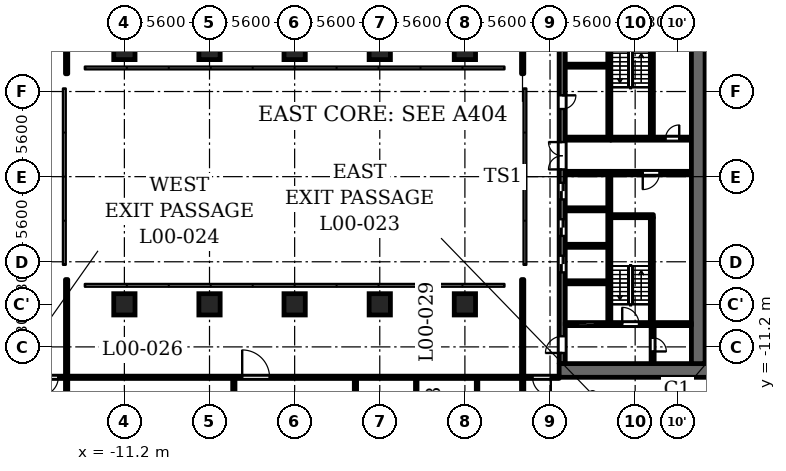
"""IFC4 building model, lengths in metres.
Left out: names, types, materials, properties, quantities, classifications, styles, units other than length and angle.
Written with IfcOpenShell. Run it as: python <this file> out.ifc"""

import sys

from ifc_helpers import new_model, si_unit, direction, frame, frame_2d, origin, origin_2d, place, context, subcontext, project, spatial, polyline, rectangle, outline, extrude, element, fill, save


model = new_model("IFC4")
c1 = context("Model", 3, precision=1e-05, world=origin(), true_north=direction((0.0, 1.0)))
c2 = subcontext(c1, "Body", "Model", "MODEL_VIEW")
j1 = project(units=[si_unit("LENGTHUNIT", "METRE"), si_unit("PLANEANGLEUNIT", "RADIAN")], contexts=[c1])
p1 = place(None, origin())
s1 = spatial("IfcSite", under=j1, at=p1, CompositionType="ELEMENT")
p2 = place(p1, origin())
s2 = spatial("IfcBuilding", under=s1, at=p2, CompositionType="ELEMENT")
p3 = place(p2, origin())
s3 = spatial("IfcBuildingStorey", under=s2, at=p3, CompositionType="ELEMENT", Elevation=0.0)
for number, where, z_axis, x_axis in (
    (1, (28.0, -11.2, 0.0), (0.0, 0.0, 1.0), (1.0, 0.0, 0.0)),
    (2, (28.0, -5.6, 0.0), (0.0, 0.0, 1.0), (1.0, 0.0, 0.0)),
    (3, (28.0, 0.0, 0.0), (0.0, 0.0, 1.0), (1.0, 0.0, 0.0)),
    (4, (28.0, 5.6, 0.0), (0.0, 0.0, 1.0), (1.0, 0.0, 0.0)),
):
    element("IfcColumn", number, at=place(p3, frame(where, z_axis=z_axis, x_axis=x_axis)), inside=s3, PredefinedType="COLUMN", context=c2, shape_type="SweptSolid", body=[
        extrude(rectangle(XDim=1.8, YDim=1.8, at=origin_2d()), origin(), (0.0, 0.0, 1.0), 6.5),
    ])
for number, where, z_axis, x_axis in (
    (5, (-11.2, -8.4, 0.0), (0.0, 0.0, 1.0), (1.0, 0.0, 0.0)),
    (6, (-11.2, 8.4, 0.0), (0.0, 0.0, 1.0), (1.0, 0.0, 0.0)),
    (7, (-5.6, -8.4, 0.0), (0.0, 0.0, 1.0), (1.0, 0.0, 0.0)),
    (8, (-5.6, 8.4, 0.0), (0.0, 0.0, 1.0), (1.0, 0.0, 0.0)),
    (9, (0.0, -8.4, 0.0), (0.0, 0.0, 1.0), (1.0, 0.0, 0.0)),
    (10, (0.0, 8.4, 0.0), (0.0, 0.0, 1.0), (1.0, 0.0, 0.0)),
    (11, (5.6, -8.4, 0.0), (0.0, 0.0, 1.0), (1.0, 0.0, 0.0)),
    (12, (5.6, 8.4, 0.0), (0.0, 0.0, 1.0), (1.0, 0.0, 0.0)),
    (13, (11.2, -8.4, 0.0), (0.0, 0.0, 1.0), (1.0, 0.0, 0.0)),
    (14, (11.2, 8.4, 0.0), (0.0, 0.0, 1.0), (1.0, 0.0, 0.0)),
):
    element("IfcColumn", number, at=place(p3, frame(where, z_axis=z_axis, x_axis=x_axis)), inside=s3, PredefinedType="COLUMN", context=c2, shape_type="SweptSolid", body=[
        extrude(rectangle(XDim=1.4, YDim=1.4, at=origin_2d()), origin(), (0.0, 0.0, 1.0), 6.5),
    ])
p4 = place(p3, frame((20.7, 2.6, 0.0), z_axis=(0.0, 0.0, 1.0), x_axis=(0.0, 1.0, 0.0)))
e15 = element("IfcWall", 15, at=p4, inside=s3, PredefinedType="SHEAR", context=c2, shape_type="SweptSolid", body=[
    extrude(rectangle(XDim=7.0, YDim=0.2, at=frame_2d((3.5, 0.0))), origin(), (0.0, 0.0, 1.0), 6.15),
])
p5 = place(p3, frame((20.7, -9.6, 0.0), z_axis=(0.0, 0.0, 1.0), x_axis=(0.0, 1.0, 0.0)))
e16 = element("IfcWall", 16, at=p5, inside=s3, PredefinedType="SHEAR", context=c2, shape_type="SweptSolid", body=[
    extrude(rectangle(XDim=9.75, YDim=0.2, at=frame_2d((4.875, 0.0))), origin(), (0.0, 0.0, 1.0), 6.15),
])
p6 = place(p3, frame((20.8, 2.5, 0.0), z_axis=(0.0, 0.0, 1.0), x_axis=(1.0, 0.0, 0.0)))
e17 = element("IfcWall", 17, at=p6, inside=s3, PredefinedType="SHEAR", context=c2, shape_type="SweptSolid", body=[
    extrude(rectangle(XDim=5.3, YDim=0.2, at=frame_2d((2.65, 0.0))), origin(), (0.0, 0.0, 1.0), 6.15),
])
p7 = place(p6, frame((3.6, 0.0, 0.0)))
e18 = element("IfcOpeningElement", 18, at=p7, cuts=e17, PredefinedType="OPENING", context=c2, shape_type="SweptSolid", body=[
    extrude(rectangle(XDim=0.9, YDim=2.1, at=frame_2d((0.45, 1.05))), frame((0.0, 0.11, 0.0), z_axis=(0.0, -1.0, 0.0), x_axis=(1.0, 0.0, 0.0)), (0.0, 0.0, 1.0), 0.22),
])
p8 = place(p3, frame((20.8, 0.25, 0.0), z_axis=(0.0, 0.0, 1.0), x_axis=(1.0, 0.0, 0.0)))
e19 = element("IfcWall", 19, at=p8, inside=s3, PredefinedType="PARTITIONING", context=c2, shape_type="SweptSolid", body=[
    extrude(rectangle(XDim=5.3, YDim=0.2, at=frame_2d((2.65, 0.0))), origin(), (0.0, 0.0, 1.0), 6.15),
])
p9 = place(p8, frame((2.1, 0.0, 0.0)))
e20 = element("IfcOpeningElement", 20, at=p9, cuts=e19, PredefinedType="OPENING", context=c2, shape_type="SweptSolid", body=[
    extrude(rectangle(XDim=1.1, YDim=2.1, at=frame_2d((0.55, 1.05))), frame((0.0, 0.11, 0.0), z_axis=(0.0, -1.0, 0.0), x_axis=(1.0, 0.0, 0.0)), (0.0, 0.0, 1.0), 0.22),
])
p10 = place(p3, frame((17.4, -12.75, 0.0), z_axis=(0.0, 0.0, 1.0), x_axis=(1.0, 0.0, 0.0)))
e21 = element("IfcWall", 21, at=p10, inside=s3, PredefinedType="SHEAR", context=c2, shape_type="SweptSolid", body=[
    extrude(rectangle(XDim=10.4, YDim=0.9, at=frame_2d((5.2, 0.0))), origin(), (0.0, 0.0, 1.0), 6.15),
])
p11 = place(p3, frame((17.6, -12.3, 0.0), z_axis=(0.0, 0.0, 1.0), x_axis=(0.0, 1.0, 0.0)))
e22 = element("IfcWall", 22, at=p11, inside=s3, PredefinedType="SHEAR", context=c2, shape_type="SweptSolid", body=[
    extrude(rectangle(XDim=24.6, YDim=0.4, at=frame_2d((12.3, 0.0))), origin(), (0.0, 0.0, 1.0), 6.15),
])
p12 = place(p11, frame((6.0, 0.0, 0.0)))
e23 = element("IfcOpeningElement", 23, at=p12, cuts=e22, PredefinedType="OPENING", context=c2, shape_type="SweptSolid", body=[
    extrude(rectangle(XDim=1.1, YDim=2.1, at=frame_2d((0.55, 1.05))), frame((0.0, 0.21, 0.0), z_axis=(0.0, -1.0, 0.0), x_axis=(1.0, 0.0, 0.0)), (0.0, 0.0, 1.0), 0.42),
])
p13 = place(p11, frame((8.4, 0.0, 0.0)))
e24 = element("IfcOpeningElement", 24, at=p13, cuts=e22, PredefinedType="OPENING", context=c2, shape_type="SweptSolid", body=[
    extrude(rectangle(XDim=1.1, YDim=2.1, at=frame_2d((0.55, 1.05))), frame((0.0, 0.21, 0.0), z_axis=(0.0, -1.0, 0.0), x_axis=(1.0, 0.0, 0.0)), (0.0, 0.0, 1.0), 0.42),
])
p14 = place(p11, frame((10.8, 0.0, 0.0)))
e25 = element("IfcOpeningElement", 25, at=p14, cuts=e22, PredefinedType="OPENING", context=c2, shape_type="SweptSolid", body=[
    extrude(rectangle(XDim=1.1, YDim=2.1, at=frame_2d((0.55, 1.05))), frame((0.0, 0.21, 0.0), z_axis=(0.0, -1.0, 0.0), x_axis=(1.0, 0.0, 0.0)), (0.0, 0.0, 1.0), 0.42),
])
p15 = place(p11, frame((16.75, 0.0, 0.0)))
e26 = element("IfcOpeningElement", 26, at=p15, cuts=e22, PredefinedType="OPENING", context=c2, shape_type="SweptSolid", body=[
    extrude(rectangle(XDim=0.9, YDim=2.1, at=frame_2d((0.45, 1.05))), frame((0.0, 0.21, 0.0), z_axis=(0.0, -1.0, 0.0), x_axis=(1.0, 0.0, 0.0)), (0.0, 0.0, 1.0), 0.42),
])
p16 = place(p11, frame((22.8, 0.0, 0.0)))
e27 = element("IfcOpeningElement", 27, at=p16, cuts=e22, PredefinedType="OPENING", context=c2, shape_type="SweptSolid", body=[
    extrude(rectangle(XDim=1.1, YDim=2.1, at=frame_2d((0.55, 1.05))), frame((0.0, 0.21, 0.0), z_axis=(0.0, -1.0, 0.0), x_axis=(1.0, 0.0, 0.0)), (0.0, 0.0, 1.0), 0.42),
])
p17 = place(p11, frame((0.7, 0.0, 0.0)))
e28 = element("IfcOpeningElement", 28, at=p17, cuts=e22, PredefinedType="OPENING", context=c2, shape_type="SweptSolid", body=[
    extrude(rectangle(XDim=1.1, YDim=2.1, at=frame_2d((0.55, 1.05))), frame((0.0, 0.21, 0.0), z_axis=(0.0, -1.0, 0.0), x_axis=(1.0, 0.0, 0.0)), (0.0, 0.0, 1.0), 0.42),
])
p18 = place(p11, frame((12.775, 0.0, 0.0)))
e29 = element("IfcOpeningElement", 29, at=p18, cuts=e22, PredefinedType="OPENING", context=c2, shape_type="SweptSolid", body=[
    extrude(rectangle(XDim=1.8, YDim=2.1, at=frame_2d((0.9, 1.05))), frame((0.0, 0.21, 0.0), z_axis=(0.0, -1.0, 0.0), x_axis=(1.0, 0.0, 0.0)), (0.0, 0.0, 1.0), 0.42),
])
p19 = place(p3, frame((26.55, -12.3, 0.0), z_axis=(0.0, 0.0, 1.0), x_axis=(0.0, 1.0, 0.0)))
e30 = element("IfcWall", 30, at=p19, inside=s3, PredefinedType="SHEAR", context=c2, shape_type="SweptSolid", body=[
    extrude(rectangle(XDim=24.6, YDim=0.9, at=frame_2d((12.3, 0.0))), origin(), (0.0, 0.0, 1.0), 6.15),
])
p20 = place(p3, frame((23.55, -12.3, 0.0), z_axis=(0.0, 0.0, 1.0), x_axis=(0.0, 1.0, 0.0)))
e31 = element("IfcWall", 31, at=p20, inside=s3, PredefinedType="PARTITIONING", context=c2, shape_type="SweptSolid", body=[
    extrude(rectangle(XDim=2.5, YDim=0.2, at=frame_2d((1.25, 0.0))), origin(), (0.0, 0.0, 1.0), 6.15),
])
p21 = place(p20, frame((0.8, 0.0, 0.0)))
e32 = element("IfcOpeningElement", 32, at=p21, cuts=e31, PredefinedType="OPENING", context=c2, shape_type="SweptSolid", body=[
    extrude(rectangle(XDim=0.9, YDim=2.1, at=frame_2d((0.45, 1.05))), frame((0.0, 0.11, 0.0), z_axis=(0.0, -1.0, 0.0), x_axis=(1.0, 0.0, 0.0)), (0.0, 0.0, 1.0), 0.22),
])
p22 = place(p3, frame((17.8, -9.7, 0.0), z_axis=(0.0, 0.0, 1.0), x_axis=(1.0, 0.0, 0.0)))
e33 = element("IfcWall", 33, at=p22, inside=s3, PredefinedType="SHEAR", context=c2, shape_type="SweptSolid", body=[
    extrude(rectangle(XDim=8.3, YDim=0.2, at=frame_2d((4.15, 0.0))), origin(), (0.0, 0.0, 1.0), 6.15),
])
p23 = place(p22, frame((0.85, 0.0, 0.0)))
e34 = element("IfcOpeningElement", 34, at=p23, cuts=e33, PredefinedType="OPENING", context=c2, shape_type="SweptSolid", body=[
    extrude(rectangle(XDim=1.1, YDim=2.1, at=frame_2d((0.55, 1.05))), frame((0.0, 0.11, 0.0), z_axis=(0.0, -1.0, 0.0), x_axis=(1.0, 0.0, 0.0)), (0.0, 0.0, 1.0), 0.22),
])
p24 = place(p22, frame((3.75, 0.0, 0.0)))
e35 = element("IfcOpeningElement", 35, at=p24, cuts=e33, PredefinedType="OPENING", context=c2, shape_type="SweptSolid", body=[
    extrude(rectangle(XDim=1.1, YDim=2.1, at=frame_2d((0.55, 1.05))), frame((0.0, 0.11, 0.0), z_axis=(0.0, -1.0, 0.0), x_axis=(1.0, 0.0, 0.0)), (0.0, 0.0, 1.0), 0.22),
])
for number, where, z_axis, x_axis in (
    (36, (17.8, -6.95, 0.0), (0.0, 0.0, 1.0), (1.0, 0.0, 0.0)),
    (37, (17.8, -4.55, 0.0), (0.0, 0.0, 1.0), (1.0, 0.0, 0.0)),
    (38, (17.8, -2.15, 0.0), (0.0, 0.0, 1.0), (1.0, 0.0, 0.0)),
):
    element("IfcWall", number, at=place(p3, frame(where, z_axis=z_axis, x_axis=x_axis)), inside=s3, PredefinedType="PARTITIONING", context=c2, shape_type="SweptSolid", body=[
        extrude(rectangle(XDim=2.8, YDim=0.2, at=frame_2d((1.4, 0.0))), origin(), (0.0, 0.0, 1.0), 6.15),
    ])
for number, where, z_axis, x_axis in (
    (39, (17.8, 0.25, 0.0), (0.0, 0.0, 1.0), (1.0, 0.0, 0.0)),
    (40, (17.8, 2.5, 0.0), (0.0, 0.0, 1.0), (1.0, 0.0, 0.0)),
):
    element("IfcWall", number, at=place(p3, frame(where, z_axis=z_axis, x_axis=x_axis)), inside=s3, PredefinedType="PARTITIONING", context=c2, shape_type="SweptSolid", body=[
        extrude(rectangle(XDim=3.0, YDim=0.2, at=frame_2d((1.5, 0.0))), origin(), (0.0, 0.0, 1.0), 6.15),
    ])
p25 = place(p3, frame((17.8, 7.3, 0.0), z_axis=(0.0, 0.0, 1.0), x_axis=(1.0, 0.0, 0.0)))
e41 = element("IfcWall", 41, at=p25, inside=s3, PredefinedType="PARTITIONING", context=c2, shape_type="SweptSolid", body=[
    extrude(rectangle(XDim=2.8, YDim=0.2, at=frame_2d((1.4, 0.0))), origin(), (0.0, 0.0, 1.0), 6.15),
])
p26 = place(p3, frame((23.5, 2.6, 0.0), z_axis=(0.0, 0.0, 1.0), x_axis=(0.0, 1.0, 0.0)))
e42 = element("IfcWall", 42, at=p26, inside=s3, PredefinedType="SHEAR", context=c2, shape_type="SweptSolid", body=[
    extrude(rectangle(XDim=7.0, YDim=0.2, at=frame_2d((3.5, 0.0))), origin(), (0.0, 0.0, 1.0), 6.15),
])
p27 = place(p3, frame((23.5, -9.6, 0.0), z_axis=(0.0, 0.0, 1.0), x_axis=(0.0, 1.0, 0.0)))
e43 = element("IfcWall", 43, at=p27, inside=s3, PredefinedType="SHEAR", context=c2, shape_type="SweptSolid", body=[
    extrude(rectangle(XDim=6.9, YDim=0.2, at=frame_2d((3.45, 0.0))), origin(), (0.0, 0.0, 1.0), 6.15),
])
p28 = place(p3, frame((20.8, -2.6, 0.0), z_axis=(0.0, 0.0, 1.0), x_axis=(1.0, 0.0, 0.0)))
e44 = element("IfcWall", 44, at=p28, inside=s3, PredefinedType="SHEAR", context=c2, shape_type="SweptSolid", body=[
    extrude(rectangle(XDim=2.8, YDim=0.2, at=frame_2d((1.4, 0.0))), origin(), (0.0, 0.0, 1.0), 6.15),
])
p29 = place(p3, frame((-17.4, -13.2, 0.0), z_axis=(0.0, 0.0, 1.0), x_axis=(1.0, 0.0, 0.0)))
e45 = element("IfcWall", 45, at=p29, inside=s3, PredefinedType="PARTITIONING", context=c2, shape_type="SweptSolid", body=[
    extrude(rectangle(XDim=34.8, YDim=0.15, at=frame_2d((17.4, 0.0))), origin(), (0.0, 0.0, 1.0), 6.15),
])
p30 = place(p29, frame((13.95, 0.0, 0.0)))
e46 = element("IfcOpeningElement", 46, at=p30, cuts=e45, PredefinedType="OPENING", context=c2, shape_type="SweptSolid", body=[
    extrude(rectangle(XDim=1.8, YDim=2.1, at=frame_2d((0.9, 1.05))), frame((0.0, 0.085, 0.0), z_axis=(0.0, -1.0, 0.0), x_axis=(1.0, 0.0, 0.0)), (0.0, 0.0, 1.0), 0.17),
])
p31 = place(p29, frame((33.05, 0.0, 0.0)))
e47 = element("IfcOpeningElement", 47, at=p31, cuts=e45, PredefinedType="OPENING", context=c2, shape_type="SweptSolid", body=[
    extrude(rectangle(XDim=1.2, YDim=2.1, at=frame_2d((0.6, 1.05))), frame((0.0, 0.085, 0.0), z_axis=(0.0, -1.0, 0.0), x_axis=(1.0, 0.0, 0.0)), (0.0, 0.0, 1.0), 0.17),
])
p32 = place(p29, frame((0.65, 0.0, 0.0)))
e48 = element("IfcOpeningElement", 48, at=p32, cuts=e45, PredefinedType="OPENING", context=c2, shape_type="SweptSolid", body=[
    extrude(rectangle(XDim=1.2, YDim=2.1, at=frame_2d((0.6, 1.05))), frame((0.0, 0.085, 0.0), z_axis=(0.0, -1.0, 0.0), x_axis=(1.0, 0.0, 0.0)), (0.0, 0.0, 1.0), 0.17),
])
p33 = place(p3, frame((-15.0, -15.525, 0.0), z_axis=(0.0, 0.0, 1.0), x_axis=(0.0, 1.0, 0.0)))
e49 = element("IfcWall", 49, at=p33, inside=s3, PredefinedType="PARTITIONING", context=c2, shape_type="SweptSolid", body=[
    extrude(rectangle(XDim=2.25, YDim=0.15, at=frame_2d((1.125, 0.0))), origin(), (0.0, 0.0, 1.0), 6.15),
])
for number, where, z_axis, x_axis in (
    (50, (-15.0, -13.125, 0.0), (0.0, 0.0, 1.0), (0.0, 1.0, 0.0)),
    (51, (-15.0, 6.769, 0.0), (0.0, 0.0, 1.0), (0.0, 1.0, 0.0)),
):
    element("IfcWall", number, at=place(p3, frame(where, z_axis=z_axis, x_axis=x_axis)), inside=s3, PredefinedType="PARTITIONING", context=c2, shape_type="SweptSolid", body=[
        extrude(rectangle(XDim=6.356, YDim=0.15, at=frame_2d((3.178, 0.0))), origin(), (0.0, 0.0, 1.0), 6.15),
    ])
for number, where, z_axis, x_axis in (
    (52, (-4.0, -22.325, 0.0), (0.0, 0.0, 1.0), (0.0, 1.0, 0.0)),
    (53, (4.0, -22.325, 0.0), (0.0, 0.0, 1.0), (0.0, 1.0, 0.0)),
):
    element("IfcWall", number, at=place(p3, frame(where, z_axis=z_axis, x_axis=x_axis)), inside=s3, PredefinedType="PARTITIONING", context=c2, shape_type="SweptSolid", body=[
        extrude(rectangle(XDim=9.05, YDim=0.15, at=frame_2d((4.525, 0.0))), origin(), (0.0, 0.0, 1.0), 6.15),
    ])
for number, where, z_axis, x_axis in (
    (54, (8.0, -22.325, 0.0), (0.0, 0.0, 1.0), (0.0, 1.0, 0.0)),
    (55, (12.0, -22.325, 0.0), (0.0, 0.0, 1.0), (0.0, 1.0, 0.0)),
):
    element("IfcWall", number, at=place(p3, frame(where, z_axis=z_axis, x_axis=x_axis)), inside=s3, PredefinedType="PARTITIONING", context=c2, shape_type="SweptSolid", body=[
        extrude(rectangle(XDim=9.05, YDim=0.1, at=frame_2d((4.525, 0.0))), origin(), (0.0, 0.0, 1.0), 6.15),
    ])
p34 = place(p3, frame((15.0, -15.6, 0.0), z_axis=(0.0, 0.0, 1.0), x_axis=(0.0, 1.0, 0.0)))
e56 = element("IfcWall", 56, at=p34, inside=s3, PredefinedType="PARTITIONING", context=c2, shape_type="SweptSolid", body=[
    extrude(rectangle(XDim=2.325, YDim=0.15, at=frame_2d((1.163, 0.0))), origin(), (0.0, 0.0, 1.0), 6.15),
])
for number, where, z_axis, x_axis in (
    (57, (15.0, -13.125, 0.0), (0.0, 0.0, 1.0), (0.0, 1.0, 0.0)),
    (58, (15.0, 6.769, 0.0), (0.0, 0.0, 1.0), (0.0, 1.0, 0.0)),
):
    element("IfcWall", number, at=place(p3, frame(where, z_axis=z_axis, x_axis=x_axis)), inside=s3, PredefinedType="PARTITIONING", context=c2, shape_type="SweptSolid", body=[
        extrude(rectangle(XDim=6.356, YDim=0.15, at=frame_2d((3.178, 0.0))), origin(), (0.0, 0.0, 1.0), 6.15),
    ])
p35 = place(p3, origin())
e59 = element("IfcWall", 59, at=p35, inside=s3, PredefinedType="SOLIDWALL", context=c2, shape_type="SweptSolid", body=[
    extrude(outline(polyline([(-13.849, 7.3), (-14.937, 6.937), (-15.3, 5.849), (-15.3, 5.8), (-15.0, 5.8), (-14.7, 6.7), (-13.8, 7.0), (-13.8, 7.3), (-13.849, 7.3)])), origin(), (0.0, 0.0, 1.0), 6.15),
])
e60 = element("IfcWall", 60, at=p35, inside=s3, PredefinedType="SOLIDWALL", context=c2, shape_type="SweptSolid", body=[
    extrude(outline(polyline([(14.937, 6.937), (13.849, 7.3), (13.8, 7.3), (13.8, 7.0), (14.7, 6.7), (15.0, 5.8), (15.3, 5.8), (15.3, 5.849), (14.937, 6.937)])), origin(), (0.0, 0.0, 1.0), 6.15),
])
e61 = element("IfcWall", 61, at=p35, inside=s3, PredefinedType="SOLIDWALL", context=c2, shape_type="SweptSolid", body=[
    extrude(outline(polyline([(14.937, -6.937), (15.3, -5.849), (15.3, -5.8), (15.0, -5.8), (14.7, -6.7), (13.8, -7.0), (13.8, -7.3), (13.849, -7.3), (14.937, -6.937)])), origin(), (0.0, 0.0, 1.0), 6.15),
])
e62 = element("IfcWall", 62, at=p35, inside=s3, PredefinedType="SOLIDWALL", context=c2, shape_type="SweptSolid", body=[
    extrude(outline(polyline([(-14.937, -6.937), (-13.849, -7.3), (-13.8, -7.3), (-13.8, -7.0), (-14.7, -6.7), (-15.0, -5.8), (-15.3, -5.8), (-15.3, -5.849), (-14.937, -6.937)])), origin(), (0.0, 0.0, 1.0), 6.15),
])
p36 = place(p23, origin())
e63 = element("IfcDoor", 63, at=p36, inside=s3, OperationType="DOUBLE_DOOR_SLIDING", PredefinedType="DOOR", context=c2, shape_type="SweptSolid", body=[
    extrude(rectangle(XDim=1.1, YDim=2.1, at=frame_2d((0.55, 1.05))), frame((0.0, 0.025, 0.0), z_axis=(0.0, -1.0, 0.0), x_axis=(1.0, 0.0, 0.0)), (0.0, 0.0, 1.0), 0.05),
])
fill(e34, e63)
p37 = place(p12, origin())
e64 = element("IfcDoor", 64, at=p37, inside=s3, OperationType="DOUBLE_DOOR_SLIDING", PredefinedType="DOOR", context=c2, shape_type="SweptSolid", body=[
    extrude(rectangle(XDim=1.1, YDim=2.1, at=frame_2d((0.55, 1.05))), frame((0.0, 0.025, 0.0), z_axis=(0.0, -1.0, 0.0), x_axis=(1.0, 0.0, 0.0)), (0.0, 0.0, 1.0), 0.05),
])
fill(e23, e64)
p38 = place(p13, origin())
e65 = element("IfcDoor", 65, at=p38, inside=s3, OperationType="DOUBLE_DOOR_SLIDING", PredefinedType="DOOR", context=c2, shape_type="SweptSolid", body=[
    extrude(rectangle(XDim=1.1, YDim=2.1, at=frame_2d((0.55, 1.05))), frame((0.0, 0.025, 0.0), z_axis=(0.0, -1.0, 0.0), x_axis=(1.0, 0.0, 0.0)), (0.0, 0.0, 1.0), 0.05),
])
fill(e24, e65)
p39 = place(p14, origin())
e66 = element("IfcDoor", 66, at=p39, inside=s3, OperationType="DOUBLE_DOOR_SLIDING", PredefinedType="DOOR", context=c2, shape_type="SweptSolid", body=[
    extrude(rectangle(XDim=1.1, YDim=2.1, at=frame_2d((0.55, 1.05))), frame((0.0, 0.025, 0.0), z_axis=(0.0, -1.0, 0.0), x_axis=(1.0, 0.0, 0.0)), (0.0, 0.0, 1.0), 0.05),
])
fill(e25, e66)
p40 = place(p15, origin())
e67 = element("IfcDoor", 67, at=p40, inside=s3, OperationType="SINGLE_SWING_RIGHT", PredefinedType="DOOR", context=c2, shape_type="SweptSolid", body=[
    extrude(rectangle(XDim=0.9, YDim=2.1, at=frame_2d((0.45, 1.05))), frame((0.0, 0.025, 0.0), z_axis=(0.0, -1.0, 0.0), x_axis=(1.0, 0.0, 0.0)), (0.0, 0.0, 1.0), 0.05),
])
fill(e26, e67)
p41 = place(p17, origin())
e68 = element("IfcDoor", 68, at=p41, inside=s3, OperationType="SINGLE_SWING_RIGHT", PredefinedType="DOOR", context=c2, shape_type="SweptSolid", body=[
    extrude(rectangle(XDim=1.1, YDim=2.1, at=frame_2d((0.55, 1.05))), frame((0.0, 0.025, 0.0), z_axis=(0.0, -1.0, 0.0), x_axis=(1.0, 0.0, 0.0)), (0.0, 0.0, 1.0), 0.05),
])
fill(e28, e68)
p42 = place(p21, origin())
e69 = element("IfcDoor", 69, at=p42, inside=s3, OperationType="SINGLE_SWING_LEFT", PredefinedType="DOOR", context=c2, shape_type="SweptSolid", body=[
    extrude(rectangle(XDim=0.9, YDim=2.1, at=frame_2d((0.45, 1.05))), frame((0.0, 0.025, 0.0), z_axis=(0.0, -1.0, 0.0), x_axis=(1.0, 0.0, 0.0)), (0.0, 0.0, 1.0), 0.05),
])
fill(e32, e69)
p43 = place(p24, origin())
e70 = element("IfcDoor", 70, at=p43, inside=s3, OperationType="SINGLE_SWING_RIGHT", PredefinedType="DOOR", context=c2, shape_type="SweptSolid", body=[
    extrude(rectangle(XDim=1.1, YDim=2.1, at=frame_2d((0.55, 1.05))), frame((0.0, 0.025, 0.0), z_axis=(0.0, -1.0, 0.0), x_axis=(1.0, 0.0, 0.0)), (0.0, 0.0, 1.0), 0.05),
])
fill(e35, e70)
p44 = place(p18, origin())
e71 = element("IfcDoor", 71, at=p44, inside=s3, OperationType="DOUBLE_DOOR_SINGLE_SWING", PredefinedType="DOOR", context=c2, shape_type="SweptSolid", body=[
    extrude(rectangle(XDim=1.8, YDim=2.1, at=frame_2d((0.9, 1.05))), frame((0.0, 0.025, 0.0), z_axis=(0.0, -1.0, 0.0), x_axis=(1.0, 0.0, 0.0)), (0.0, 0.0, 1.0), 0.05),
])
fill(e29, e71)
p45 = place(p9, origin())
e72 = element("IfcDoor", 72, at=p45, inside=s3, OperationType="SINGLE_SWING_LEFT", PredefinedType="DOOR", context=c2, shape_type="SweptSolid", body=[
    extrude(rectangle(XDim=1.1, YDim=2.1, at=frame_2d((0.55, 1.05))), frame((0.0, 0.025, 0.0), z_axis=(0.0, -1.0, 0.0), x_axis=(1.0, 0.0, 0.0)), (0.0, 0.0, 1.0), 0.05),
])
fill(e20, e72)
p46 = place(p7, origin())
e73 = element("IfcDoor", 73, at=p46, inside=s3, OperationType="SINGLE_SWING_LEFT", PredefinedType="DOOR", context=c2, shape_type="SweptSolid", body=[
    extrude(rectangle(XDim=0.9, YDim=2.1, at=frame_2d((0.45, 1.05))), frame((0.0, 0.025, 0.0), z_axis=(0.0, -1.0, 0.0), x_axis=(1.0, 0.0, 0.0)), (0.0, 0.0, 1.0), 0.05),
])
fill(e18, e73)
p47 = place(p30, origin())
e74 = element("IfcDoor", 74, at=p47, inside=s3, OperationType="SINGLE_SWING_RIGHT", PredefinedType="DOOR", context=c2, shape_type="SweptSolid", body=[
    extrude(rectangle(XDim=1.8, YDim=2.1, at=frame_2d((0.9, 1.05))), frame((0.0, 0.025, 0.0), z_axis=(0.0, -1.0, 0.0), x_axis=(1.0, 0.0, 0.0)), (0.0, 0.0, 1.0), 0.05),
])
fill(e46, e74)
p48 = place(p31, origin())
e75 = element("IfcDoor", 75, at=p48, inside=s3, OperationType="SINGLE_SWING_RIGHT", PredefinedType="DOOR", context=c2, shape_type="SweptSolid", body=[
    extrude(rectangle(XDim=1.2, YDim=2.1, at=frame_2d((0.6, 1.05))), frame((0.0, 0.025, 0.0), z_axis=(0.0, -1.0, 0.0), x_axis=(1.0, 0.0, 0.0)), (0.0, 0.0, 1.0), 0.05),
])
fill(e47, e75)
p49 = place(p32, origin())
e76 = element("IfcDoor", 76, at=p49, inside=s3, OperationType="SINGLE_SWING_LEFT", PredefinedType="DOOR", context=c2, shape_type="SweptSolid", body=[
    extrude(rectangle(XDim=1.2, YDim=2.1, at=frame_2d((0.6, 1.05))), frame((0.0, 0.025, 0.0), z_axis=(0.0, -1.0, 0.0), x_axis=(1.0, 0.0, 0.0)), (0.0, 0.0, 1.0), 0.05),
])
fill(e48, e76)
save(model, sys.argv[1])
